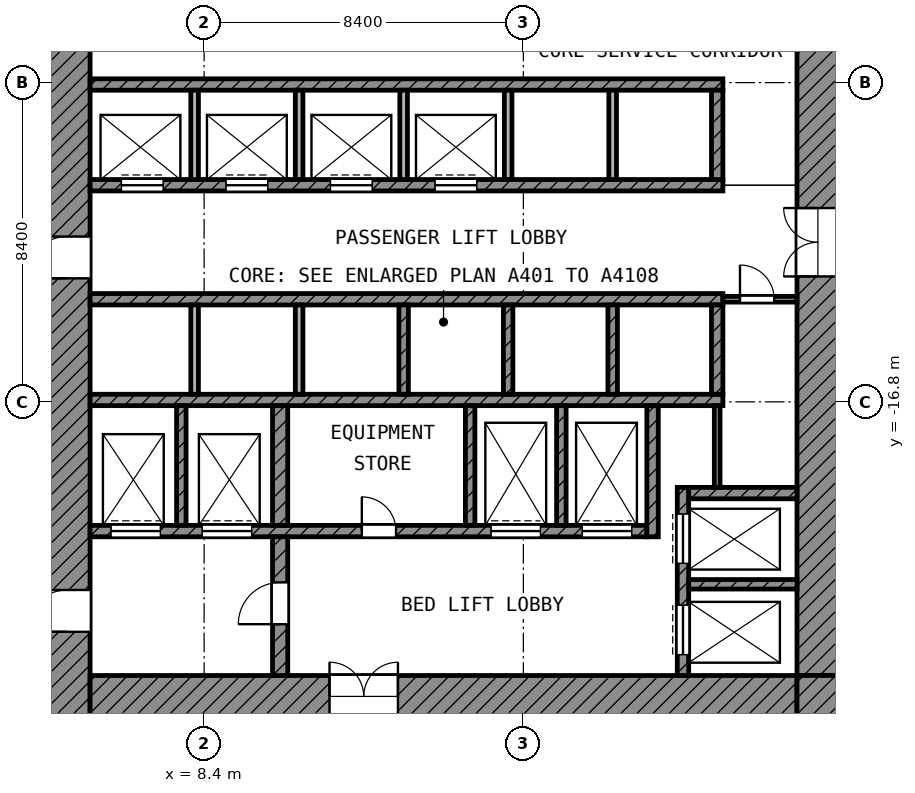
"""IFC4 building model, lengths in metres.
Left out: names, types, materials, properties, quantities, classifications, styles, units other than length and angle.
Written with IfcOpenShell. Run it as: python <this file> out.ifc"""

import sys

from ifc_helpers import new_model, si_unit, direction, frame, frame_2d, origin, place, context, subcontext, project, spatial, rectangle, extrude, element, fill, save


model = new_model("IFC4")
c1 = context("Model", 3, precision=1e-05, world=origin(), true_north=direction((0.0, 1.0)))
c2 = subcontext(c1, "Body", "Model", "MODEL_VIEW")
j1 = project(units=[si_unit("LENGTHUNIT", "METRE"), si_unit("PLANEANGLEUNIT", "RADIAN")], contexts=[c1])
p1 = place(None, origin())
s1 = spatial("IfcSite", under=j1, at=p1, CompositionType="ELEMENT")
p2 = place(p1, origin())
s2 = spatial("IfcBuilding", under=s1, at=p2, CompositionType="ELEMENT")
p3 = place(p2, frame((0.0, 0.0, 60.2)))
s3 = spatial("IfcBuildingStorey", under=s2, at=p3, CompositionType="ELEMENT", Elevation=60.2)
p4 = place(p3, frame((4.8, -25.1, 0.0), z_axis=(0.0, 0.0, 1.0), x_axis=(0.0, 1.0, 0.0)))
e1 = element("IfcWall", 1, at=p4, inside=s3, PredefinedType="SHEAR", context=c2, shape_type="SweptSolid", body=[
    extrude(rectangle(XDim=19.7, YDim=1.2, at=frame_2d((9.85, 0.0))), origin(), (0.0, 0.0, 1.0), 3.9),
])
p5 = place(p4, frame((11.55, 0.0, 0.0)))
e2 = element("IfcOpeningElement", 2, at=p5, cuts=e1, PredefinedType="OPENING", context=c2, shape_type="SweptSolid", body=[
    extrude(rectangle(XDim=1.1, YDim=2.1, at=frame_2d((0.55, 1.05))), frame((0.0, 0.61, 0.0), z_axis=(0.0, -1.0, 0.0), x_axis=(1.0, 0.0, 0.0)), (0.0, 0.0, 1.0), 1.22),
])
p6 = place(p4, frame((2.25, 0.0, 0.0)))
e3 = element("IfcOpeningElement", 3, at=p6, cuts=e1, PredefinedType="OPENING", context=c2, shape_type="SweptSolid", body=[
    extrude(rectangle(XDim=1.1, YDim=2.1, at=frame_2d((0.55, 1.05))), frame((0.0, 0.61, 0.0), z_axis=(0.0, -1.0, 0.0), x_axis=(1.0, 0.0, 0.0)), (0.0, 0.0, 1.0), 1.22),
])
p7 = place(p3, frame((24.55, -24.0, 0.0), z_axis=(0.0, 0.0, 1.0), x_axis=(0.0, 1.0, 0.0)))
e4 = element("IfcWall", 4, at=p7, inside=s3, PredefinedType="SHEAR", context=c2, shape_type="SweptSolid", body=[
    extrude(rectangle(XDim=18.6, YDim=1.1, at=frame_2d((9.3, 0.0))), origin(), (0.0, 0.0, 1.0), 3.9),
])
p8 = place(p7, frame((10.5, 0.0, 0.0)))
e5 = element("IfcOpeningElement", 5, at=p8, cuts=e4, PredefinedType="OPENING", context=c2, shape_type="SweptSolid", body=[
    extrude(rectangle(XDim=1.8, YDim=2.1, at=frame_2d((0.9, 1.05))), frame((0.0, 0.56, 0.0), z_axis=(0.0, -1.0, 0.0), x_axis=(1.0, 0.0, 0.0)), (0.0, 0.0, 1.0), 1.12),
])
p9 = place(p3, frame((5.4, -24.55, 0.0), z_axis=(0.0, 0.0, 1.0), x_axis=(1.0, 0.0, 0.0)))
e6 = element("IfcWall", 6, at=p9, inside=s3, PredefinedType="SHEAR", context=c2, shape_type="SweptSolid", body=[
    extrude(rectangle(XDim=18.6, YDim=1.1, at=frame_2d((9.3, 0.0))), origin(), (0.0, 0.0, 1.0), 3.9),
])
p10 = place(p9, frame((6.3, 0.0, 0.0)))
e7 = element("IfcOpeningElement", 7, at=p10, cuts=e6, PredefinedType="OPENING", context=c2, shape_type="SweptSolid", body=[
    extrude(rectangle(XDim=1.8, YDim=2.1, at=frame_2d((0.9, 1.05))), frame((0.0, 0.56, 0.0), z_axis=(0.0, -1.0, 0.0), x_axis=(1.0, 0.0, 0.0)), (0.0, 0.0, 1.0), 1.12),
])
p11 = place(p3, frame((24.55, -25.1, 0.0), z_axis=(0.0, 0.0, 1.0), x_axis=(0.0, 1.0, 0.0)))
e8 = element("IfcWall", 8, at=p11, inside=s3, PredefinedType="SHEAR", context=c2, shape_type="SweptSolid", body=[
    extrude(rectangle(XDim=1.1, YDim=1.1, at=frame_2d((0.55, 0.0))), origin(), (0.0, 0.0, 1.0), 3.9),
])
p12 = place(p3, frame((5.4, -8.45, 0.0), z_axis=(0.0, 0.0, 1.0), x_axis=(1.0, 0.0, 0.0)))
e9 = element("IfcWall", 9, at=p12, inside=s3, PredefinedType="SHEAR", context=c2, shape_type="SweptSolid", body=[
    extrude(rectangle(XDim=16.65, YDim=0.3, at=frame_2d((8.325, 0.0))), origin(), (0.0, 0.0, 1.0), 3.9),
])
p13 = place(p3, frame((5.4, -11.1, 0.0), z_axis=(0.0, 0.0, 1.0), x_axis=(1.0, 0.0, 0.0)))
e10 = element("IfcWall", 10, at=p13, inside=s3, PredefinedType="SHEAR", context=c2, shape_type="SweptSolid", body=[
    extrude(rectangle(XDim=16.65, YDim=0.3, at=frame_2d((8.325, 0.0))), origin(), (0.0, 0.0, 1.0), 3.9),
])
p14 = place(p13, frame((0.825, 0.0, 0.0)))
e11 = element("IfcOpeningElement", 11, at=p14, cuts=e10, PredefinedType="OPENING", context=c2, shape_type="SweptSolid", body=[
    extrude(rectangle(XDim=1.1, YDim=2.1, at=frame_2d((0.55, 1.05))), frame((0.0, 0.16, 0.0), z_axis=(0.0, -1.0, 0.0), x_axis=(1.0, 0.0, 0.0)), (0.0, 0.0, 1.0), 0.32),
])
p15 = place(p13, frame((3.575, 0.0, 0.0)))
e12 = element("IfcOpeningElement", 12, at=p15, cuts=e10, PredefinedType="OPENING", context=c2, shape_type="SweptSolid", body=[
    extrude(rectangle(XDim=1.1, YDim=2.1, at=frame_2d((0.55, 1.05))), frame((0.0, 0.16, 0.0), z_axis=(0.0, -1.0, 0.0), x_axis=(1.0, 0.0, 0.0)), (0.0, 0.0, 1.0), 0.32),
])
p16 = place(p13, frame((6.325, 0.0, 0.0)))
e13 = element("IfcOpeningElement", 13, at=p16, cuts=e10, PredefinedType="OPENING", context=c2, shape_type="SweptSolid", body=[
    extrude(rectangle(XDim=1.1, YDim=2.1, at=frame_2d((0.55, 1.05))), frame((0.0, 0.16, 0.0), z_axis=(0.0, -1.0, 0.0), x_axis=(1.0, 0.0, 0.0)), (0.0, 0.0, 1.0), 0.32),
])
p17 = place(p13, frame((9.075, 0.0, 0.0)))
e14 = element("IfcOpeningElement", 14, at=p17, cuts=e10, PredefinedType="OPENING", context=c2, shape_type="SweptSolid", body=[
    extrude(rectangle(XDim=1.1, YDim=2.1, at=frame_2d((0.55, 1.05))), frame((0.0, 0.16, 0.0), z_axis=(0.0, -1.0, 0.0), x_axis=(1.0, 0.0, 0.0)), (0.0, 0.0, 1.0), 0.32),
])
for number, where, z_axis, x_axis in (
    (15, (5.4, -14.1, 0.0), (0.0, 0.0, 1.0), (1.0, 0.0, 0.0)),
    (16, (5.4, -16.75, 0.0), (0.0, 0.0, 1.0), (1.0, 0.0, 0.0)),
):
    element("IfcWall", number, at=place(p3, frame(where, z_axis=z_axis, x_axis=x_axis)), inside=s3, PredefinedType="SHEAR", context=c2, shape_type="SweptSolid", body=[
        extrude(rectangle(XDim=16.65, YDim=0.3, at=frame_2d((8.325, 0.0))), origin(), (0.0, 0.0, 1.0), 3.9),
    ])
p18 = place(p3, frame((5.4, -20.2, 0.0), z_axis=(0.0, 0.0, 1.0), x_axis=(1.0, 0.0, 0.0)))
e17 = element("IfcWall", 17, at=p18, inside=s3, PredefinedType="SHEAR", context=c2, shape_type="SweptSolid", body=[
    extrude(rectangle(XDim=14.65, YDim=0.3, at=frame_2d((7.325, 0.0))), origin(), (0.0, 0.0, 1.0), 3.9),
])
p19 = place(p18, frame((10.55, 0.0, 0.0)))
e18 = element("IfcOpeningElement", 18, at=p19, cuts=e17, PredefinedType="OPENING", context=c2, shape_type="SweptSolid", body=[
    extrude(rectangle(XDim=1.3, YDim=2.1, at=frame_2d((0.65, 1.05))), frame((0.0, 0.16, 0.0), z_axis=(0.0, -1.0, 0.0), x_axis=(1.0, 0.0, 0.0)), (0.0, 0.0, 1.0), 0.32),
])
p20 = place(p18, frame((12.95, 0.0, 0.0)))
e19 = element("IfcOpeningElement", 19, at=p20, cuts=e17, PredefinedType="OPENING", context=c2, shape_type="SweptSolid", body=[
    extrude(rectangle(XDim=1.3, YDim=2.1, at=frame_2d((0.65, 1.05))), frame((0.0, 0.16, 0.0), z_axis=(0.0, -1.0, 0.0), x_axis=(1.0, 0.0, 0.0)), (0.0, 0.0, 1.0), 0.32),
])
p21 = place(p18, frame((0.55, 0.0, 0.0)))
e20 = element("IfcOpeningElement", 20, at=p21, cuts=e17, PredefinedType="OPENING", context=c2, shape_type="SweptSolid", body=[
    extrude(rectangle(XDim=1.3, YDim=2.1, at=frame_2d((0.65, 1.05))), frame((0.0, 0.16, 0.0), z_axis=(0.0, -1.0, 0.0), x_axis=(1.0, 0.0, 0.0)), (0.0, 0.0, 1.0), 0.32),
])
p22 = place(p18, frame((2.95, 0.0, 0.0)))
e21 = element("IfcOpeningElement", 21, at=p22, cuts=e17, PredefinedType="OPENING", context=c2, shape_type="SweptSolid", body=[
    extrude(rectangle(XDim=1.3, YDim=2.1, at=frame_2d((0.65, 1.05))), frame((0.0, 0.16, 0.0), z_axis=(0.0, -1.0, 0.0), x_axis=(1.0, 0.0, 0.0)), (0.0, 0.0, 1.0), 0.32),
])
p23 = place(p18, frame((7.15, 0.0, 0.0)))
e22 = element("IfcOpeningElement", 22, at=p23, cuts=e17, PredefinedType="OPENING", context=c2, shape_type="SweptSolid", body=[
    extrude(rectangle(XDim=0.9, YDim=2.1, at=frame_2d((0.45, 1.05))), frame((0.0, 0.16, 0.0), z_axis=(0.0, -1.0, 0.0), x_axis=(1.0, 0.0, 0.0)), (0.0, 0.0, 1.0), 0.32),
])
p24 = place(p3, frame((10.4, -24.0, 0.0), z_axis=(0.0, 0.0, 1.0), x_axis=(0.0, 1.0, 0.0)))
e23 = element("IfcWall", 23, at=p24, inside=s3, PredefinedType="SHEAR", context=c2, shape_type="SweptSolid", body=[
    extrude(rectangle(XDim=3.65, YDim=0.4, at=frame_2d((1.825, 0.0))), origin(), (0.0, 0.0, 1.0), 3.9),
])
p25 = place(p24, frame((1.35, 0.0, 0.0)))
e24 = element("IfcOpeningElement", 24, at=p25, cuts=e23, PredefinedType="OPENING", context=c2, shape_type="SweptSolid", body=[
    extrude(rectangle(XDim=1.1, YDim=2.1, at=frame_2d((0.55, 1.05))), frame((0.0, 0.21, 0.0), z_axis=(0.0, -1.0, 0.0), x_axis=(1.0, 0.0, 0.0)), (0.0, 0.0, 1.0), 0.42),
])
p26 = place(p3, frame((10.4, -20.05, 0.0), z_axis=(0.0, 0.0, 1.0), x_axis=(0.0, 1.0, 0.0)))
e25 = element("IfcWall", 25, at=p26, inside=s3, PredefinedType="SHEAR", context=c2, shape_type="SweptSolid", body=[
    extrude(rectangle(XDim=3.15, YDim=0.4, at=frame_2d((1.575, 0.0))), origin(), (0.0, 0.0, 1.0), 3.9),
])
p27 = place(p3, frame((20.2, -20.35, 0.0), z_axis=(0.0, 0.0, 1.0), x_axis=(0.0, 1.0, 0.0)))
e26 = element("IfcWall", 26, at=p27, inside=s3, PredefinedType="SHEAR", context=c2, shape_type="SweptSolid", body=[
    extrude(rectangle(XDim=3.45, YDim=0.3, at=frame_2d((1.725, 0.0))), origin(), (0.0, 0.0, 1.0), 3.9),
])
p28 = place(p3, frame((21.9, -10.95, 0.0), z_axis=(0.0, 0.0, 1.0), x_axis=(0.0, 1.0, 0.0)))
e27 = element("IfcWall", 27, at=p28, inside=s3, PredefinedType="SHEAR", context=c2, shape_type="SweptSolid", body=[
    extrude(rectangle(XDim=2.35, YDim=0.3, at=frame_2d((1.175, 0.0))), origin(), (0.0, 0.0, 1.0), 3.9),
])
p29 = place(p3, frame((21.9, -16.6, 0.0), z_axis=(0.0, 0.0, 1.0), x_axis=(0.0, 1.0, 0.0)))
e28 = element("IfcWall", 28, at=p29, inside=s3, PredefinedType="SHEAR", context=c2, shape_type="SweptSolid", body=[
    extrude(rectangle(XDim=2.35, YDim=0.3, at=frame_2d((1.175, 0.0))), origin(), (0.0, 0.0, 1.0), 3.9),
])
p30 = place(p3, frame((21.15, -19.2, 0.0), z_axis=(0.0, 0.0, 1.0), x_axis=(1.0, 0.0, 0.0)))
e29 = element("IfcWall", 29, at=p30, inside=s3, PredefinedType="SHEAR", context=c2, shape_type="SweptSolid", body=[
    extrude(rectangle(XDim=2.85, YDim=0.3, at=frame_2d((1.425, 0.0))), origin(), (0.0, 0.0, 1.0), 3.9),
])
p31 = place(p3, frame((21.0, -24.0, 0.0), z_axis=(0.0, 0.0, 1.0), x_axis=(0.0, 1.0, 0.0)))
e30 = element("IfcWall", 30, at=p31, inside=s3, PredefinedType="SHEAR", context=c2, shape_type="SweptSolid", body=[
    extrude(rectangle(XDim=4.95, YDim=0.3, at=frame_2d((2.475, 0.0))), origin(), (0.0, 0.0, 1.0), 3.9),
])
p32 = place(p31, frame((2.95, 0.0, 0.0)))
e31 = element("IfcOpeningElement", 31, at=p32, cuts=e30, PredefinedType="OPENING", context=c2, shape_type="SweptSolid", body=[
    extrude(rectangle(XDim=1.3, YDim=2.1, at=frame_2d((0.65, 1.05))), frame((0.0, 0.16, 0.0), z_axis=(0.0, -1.0, 0.0), x_axis=(1.0, 0.0, 0.0)), (0.0, 0.0, 1.0), 0.32),
])
p33 = place(p31, frame((0.55, 0.0, 0.0)))
e32 = element("IfcOpeningElement", 32, at=p33, cuts=e30, PredefinedType="OPENING", context=c2, shape_type="SweptSolid", body=[
    extrude(rectangle(XDim=1.3, YDim=2.1, at=frame_2d((0.65, 1.05))), frame((0.0, 0.16, 0.0), z_axis=(0.0, -1.0, 0.0), x_axis=(1.0, 0.0, 0.0)), (0.0, 0.0, 1.0), 0.32),
])
p34 = place(p3, frame((21.15, -21.6, 0.0), z_axis=(0.0, 0.0, 1.0), x_axis=(1.0, 0.0, 0.0)))
e33 = element("IfcWall", 33, at=p34, inside=s3, PredefinedType="SHEAR", context=c2, shape_type="SweptSolid", body=[
    extrude(rectangle(XDim=2.85, YDim=0.25, at=frame_2d((1.425, 0.0))), origin(), (0.0, 0.0, 1.0), 3.9),
])
for number, where, z_axis, x_axis in (
    (34, (7.8, -20.05, 0.0), (0.0, 0.0, 1.0), (0.0, 1.0, 0.0)),
    (35, (15.4, -20.05, 0.0), (0.0, 0.0, 1.0), (0.0, 1.0, 0.0)),
    (36, (17.8, -20.05, 0.0), (0.0, 0.0, 1.0), (0.0, 1.0, 0.0)),
):
    element("IfcWall", number, at=place(p3, frame(where, z_axis=z_axis, x_axis=x_axis)), inside=s3, PredefinedType="SHEAR", context=c2, shape_type="SweptSolid", body=[
        extrude(rectangle(XDim=3.15, YDim=0.25, at=frame_2d((1.575, 0.0))), origin(), (0.0, 0.0, 1.0), 3.9),
    ])
for number, where, z_axis, x_axis in (
    (37, (8.15, -10.95, 0.0), (0.0, 0.0, 1.0), (0.0, 1.0, 0.0)),
    (38, (10.9, -10.95, 0.0), (0.0, 0.0, 1.0), (0.0, 1.0, 0.0)),
    (39, (13.65, -10.95, 0.0), (0.0, 0.0, 1.0), (0.0, 1.0, 0.0)),
    (40, (16.4, -10.95, 0.0), (0.0, 0.0, 1.0), (0.0, 1.0, 0.0)),
    (41, (19.15, -10.95, 0.0), (0.0, 0.0, 1.0), (0.0, 1.0, 0.0)),
):
    element("IfcWall", number, at=place(p3, frame(where, z_axis=z_axis, x_axis=x_axis)), inside=s3, PredefinedType="PARTITIONING", context=c2, shape_type="SweptSolid", body=[
        extrude(rectangle(XDim=2.35, YDim=0.2, at=frame_2d((1.175, 0.0))), origin(), (0.0, 0.0, 1.0), 3.9),
    ])
for number, where, z_axis, x_axis in (
    (42, (8.15, -16.6, 0.0), (0.0, 0.0, 1.0), (0.0, 1.0, 0.0)),
    (43, (10.9, -16.6, 0.0), (0.0, 0.0, 1.0), (0.0, 1.0, 0.0)),
):
    element("IfcWall", number, at=place(p3, frame(where, z_axis=z_axis, x_axis=x_axis)), inside=s3, PredefinedType="PARTITIONING", context=c2, shape_type="SweptSolid", body=[
        extrude(rectangle(XDim=2.35, YDim=0.2, at=frame_2d((1.175, 0.0))), origin(), (0.0, 0.0, 1.0), 3.9),
    ])
for number, where, z_axis, x_axis in (
    (44, (13.65, -16.6, 0.0), (0.0, 0.0, 1.0), (0.0, 1.0, 0.0)),
    (45, (16.4, -16.6, 0.0), (0.0, 0.0, 1.0), (0.0, 1.0, 0.0)),
    (46, (19.15, -16.6, 0.0), (0.0, 0.0, 1.0), (0.0, 1.0, 0.0)),
):
    element("IfcWall", number, at=place(p3, frame(where, z_axis=z_axis, x_axis=x_axis)), inside=s3, PredefinedType="SHEAR", context=c2, shape_type="SweptSolid", body=[
        extrude(rectangle(XDim=2.35, YDim=0.25, at=frame_2d((1.175, 0.0))), origin(), (0.0, 0.0, 1.0), 3.9),
    ])
p35 = place(p3, frame((21.9, -19.05, 0.0), z_axis=(0.0, 0.0, 1.0), x_axis=(0.0, 1.0, 0.0)))
e47 = element("IfcWall", 47, at=p35, inside=s3, PredefinedType="PARTITIONING", context=c2, shape_type="SweptSolid", body=[
    extrude(rectangle(XDim=2.15, YDim=0.15, at=frame_2d((1.075, 0.0))), origin(), (0.0, 0.0, 1.0), 3.9),
])
p36 = place(p3, frame((22.05, -14.1, 0.0), z_axis=(0.0, 0.0, 1.0), x_axis=(1.0, 0.0, 0.0)))
e48 = element("IfcWall", 48, at=p36, inside=s3, PredefinedType="PARTITIONING", context=c2, shape_type="SweptSolid", body=[
    extrude(rectangle(XDim=1.95, YDim=0.15, at=frame_2d((0.975, 0.0))), origin(), (0.0, 0.0, 1.0), 3.9),
])
p37 = place(p36, frame((0.45, 0.0, 0.0)))
e49 = element("IfcOpeningElement", 49, at=p37, cuts=e48, PredefinedType="OPENING", context=c2, shape_type="SweptSolid", body=[
    extrude(rectangle(XDim=0.9, YDim=2.1, at=frame_2d((0.45, 1.05))), frame((0.0, 0.085, 0.0), z_axis=(0.0, -1.0, 0.0), x_axis=(1.0, 0.0, 0.0)), (0.0, 0.0, 1.0), 0.17),
])
p38 = place(p14, origin())
e50 = element("IfcDoor", 50, at=p38, inside=s3, OperationType="DOUBLE_DOOR_SLIDING", PredefinedType="DOOR", context=c2, shape_type="SweptSolid", body=[
    extrude(rectangle(XDim=1.1, YDim=2.1, at=frame_2d((0.55, 1.05))), frame((0.0, 0.025, 0.0), z_axis=(0.0, -1.0, 0.0), x_axis=(1.0, 0.0, 0.0)), (0.0, 0.0, 1.0), 0.05),
])
fill(e11, e50)
p39 = place(p15, origin())
e51 = element("IfcDoor", 51, at=p39, inside=s3, OperationType="DOUBLE_DOOR_SLIDING", PredefinedType="DOOR", context=c2, shape_type="SweptSolid", body=[
    extrude(rectangle(XDim=1.1, YDim=2.1, at=frame_2d((0.55, 1.05))), frame((0.0, 0.025, 0.0), z_axis=(0.0, -1.0, 0.0), x_axis=(1.0, 0.0, 0.0)), (0.0, 0.0, 1.0), 0.05),
])
fill(e12, e51)
p40 = place(p16, origin())
e52 = element("IfcDoor", 52, at=p40, inside=s3, OperationType="DOUBLE_DOOR_SLIDING", PredefinedType="DOOR", context=c2, shape_type="SweptSolid", body=[
    extrude(rectangle(XDim=1.1, YDim=2.1, at=frame_2d((0.55, 1.05))), frame((0.0, 0.025, 0.0), z_axis=(0.0, -1.0, 0.0), x_axis=(1.0, 0.0, 0.0)), (0.0, 0.0, 1.0), 0.05),
])
fill(e13, e52)
p41 = place(p17, origin())
e53 = element("IfcDoor", 53, at=p41, inside=s3, OperationType="DOUBLE_DOOR_SLIDING", PredefinedType="DOOR", context=c2, shape_type="SweptSolid", body=[
    extrude(rectangle(XDim=1.1, YDim=2.1, at=frame_2d((0.55, 1.05))), frame((0.0, 0.025, 0.0), z_axis=(0.0, -1.0, 0.0), x_axis=(1.0, 0.0, 0.0)), (0.0, 0.0, 1.0), 0.05),
])
fill(e14, e53)
p42 = place(p32, origin())
e54 = element("IfcDoor", 54, at=p42, inside=s3, OperationType="DOUBLE_DOOR_SLIDING", PredefinedType="DOOR", context=c2, shape_type="SweptSolid", body=[
    extrude(rectangle(XDim=1.3, YDim=2.1, at=frame_2d((0.65, 1.05))), frame((0.0, 0.025, 0.0), z_axis=(0.0, -1.0, 0.0), x_axis=(1.0, 0.0, 0.0)), (0.0, 0.0, 1.0), 0.05),
])
fill(e31, e54)
p43 = place(p33, origin())
e55 = element("IfcDoor", 55, at=p43, inside=s3, OperationType="DOUBLE_DOOR_SLIDING", PredefinedType="DOOR", context=c2, shape_type="SweptSolid", body=[
    extrude(rectangle(XDim=1.3, YDim=2.1, at=frame_2d((0.65, 1.05))), frame((0.0, 0.025, 0.0), z_axis=(0.0, -1.0, 0.0), x_axis=(1.0, 0.0, 0.0)), (0.0, 0.0, 1.0), 0.05),
])
fill(e32, e55)
p44 = place(p19, origin())
e56 = element("IfcDoor", 56, at=p44, inside=s3, OperationType="DOUBLE_DOOR_SLIDING", PredefinedType="DOOR", context=c2, shape_type="SweptSolid", body=[
    extrude(rectangle(XDim=1.3, YDim=2.1, at=frame_2d((0.65, 1.05))), frame((0.0, 0.025, 0.0), z_axis=(0.0, -1.0, 0.0), x_axis=(1.0, 0.0, 0.0)), (0.0, 0.0, 1.0), 0.05),
])
fill(e18, e56)
p45 = place(p20, origin())
e57 = element("IfcDoor", 57, at=p45, inside=s3, OperationType="DOUBLE_DOOR_SLIDING", PredefinedType="DOOR", context=c2, shape_type="SweptSolid", body=[
    extrude(rectangle(XDim=1.3, YDim=2.1, at=frame_2d((0.65, 1.05))), frame((0.0, 0.025, 0.0), z_axis=(0.0, -1.0, 0.0), x_axis=(1.0, 0.0, 0.0)), (0.0, 0.0, 1.0), 0.05),
])
fill(e19, e57)
p46 = place(p21, origin())
e58 = element("IfcDoor", 58, at=p46, inside=s3, OperationType="DOUBLE_DOOR_SLIDING", PredefinedType="DOOR", context=c2, shape_type="SweptSolid", body=[
    extrude(rectangle(XDim=1.3, YDim=2.1, at=frame_2d((0.65, 1.05))), frame((0.0, 0.025, 0.0), z_axis=(0.0, -1.0, 0.0), x_axis=(1.0, 0.0, 0.0)), (0.0, 0.0, 1.0), 0.05),
])
fill(e20, e58)
p47 = place(p22, origin())
e59 = element("IfcDoor", 59, at=p47, inside=s3, OperationType="DOUBLE_DOOR_SLIDING", PredefinedType="DOOR", context=c2, shape_type="SweptSolid", body=[
    extrude(rectangle(XDim=1.3, YDim=2.1, at=frame_2d((0.65, 1.05))), frame((0.0, 0.025, 0.0), z_axis=(0.0, -1.0, 0.0), x_axis=(1.0, 0.0, 0.0)), (0.0, 0.0, 1.0), 0.05),
])
fill(e21, e59)
p48 = place(p5, origin())
e60 = element("IfcDoor", 60, at=p48, inside=s3, OperationType="SINGLE_SWING_LEFT", PredefinedType="DOOR", context=c2, shape_type="SweptSolid", body=[
    extrude(rectangle(XDim=1.1, YDim=2.1, at=frame_2d((0.55, 1.05))), frame((0.0, 0.025, 0.0), z_axis=(0.0, -1.0, 0.0), x_axis=(1.0, 0.0, 0.0)), (0.0, 0.0, 1.0), 0.05),
])
fill(e2, e60)
p49 = place(p6, origin())
e61 = element("IfcDoor", 61, at=p49, inside=s3, OperationType="SINGLE_SWING_LEFT", PredefinedType="DOOR", context=c2, shape_type="SweptSolid", body=[
    extrude(rectangle(XDim=1.1, YDim=2.1, at=frame_2d((0.55, 1.05))), frame((0.0, 0.025, 0.0), z_axis=(0.0, -1.0, 0.0), x_axis=(1.0, 0.0, 0.0)), (0.0, 0.0, 1.0), 0.05),
])
fill(e3, e61)
p50 = place(p25, origin())
e62 = element("IfcDoor", 62, at=p50, inside=s3, OperationType="SINGLE_SWING_LEFT", PredefinedType="DOOR", context=c2, shape_type="SweptSolid", body=[
    extrude(rectangle(XDim=1.1, YDim=2.1, at=frame_2d((0.55, 1.05))), frame((0.0, 0.025, 0.0), z_axis=(0.0, -1.0, 0.0), x_axis=(1.0, 0.0, 0.0)), (0.0, 0.0, 1.0), 0.05),
])
fill(e24, e62)
p51 = place(p8, origin())
e63 = element("IfcDoor", 63, at=p51, inside=s3, OperationType="DOUBLE_DOOR_SINGLE_SWING", PredefinedType="DOOR", context=c2, shape_type="SweptSolid", body=[
    extrude(rectangle(XDim=1.8, YDim=2.1, at=frame_2d((0.9, 1.05))), frame((0.0, 0.025, 0.0), z_axis=(0.0, -1.0, 0.0), x_axis=(1.0, 0.0, 0.0)), (0.0, 0.0, 1.0), 0.05),
])
fill(e5, e63)
p52 = place(p10, origin())
e64 = element("IfcDoor", 64, at=p52, inside=s3, OperationType="DOUBLE_DOOR_SINGLE_SWING", PredefinedType="DOOR", context=c2, shape_type="SweptSolid", body=[
    extrude(rectangle(XDim=1.8, YDim=2.1, at=frame_2d((0.9, 1.05))), frame((0.0, 0.025, 0.0), z_axis=(0.0, -1.0, 0.0), x_axis=(1.0, 0.0, 0.0)), (0.0, 0.0, 1.0), 0.05),
])
fill(e7, e64)
p53 = place(p37, origin())
e65 = element("IfcDoor", 65, at=p53, inside=s3, OperationType="SINGLE_SWING_LEFT", PredefinedType="DOOR", context=c2, shape_type="SweptSolid", body=[
    extrude(rectangle(XDim=0.9, YDim=2.1, at=frame_2d((0.45, 1.05))), frame((0.0, 0.025, 0.0), z_axis=(0.0, -1.0, 0.0), x_axis=(1.0, 0.0, 0.0)), (0.0, 0.0, 1.0), 0.05),
])
fill(e49, e65)
p54 = place(p23, origin())
e66 = element("IfcDoor", 66, at=p54, inside=s3, OperationType="SINGLE_SWING_LEFT", PredefinedType="DOOR", context=c2, shape_type="SweptSolid", body=[
    extrude(rectangle(XDim=0.9, YDim=2.1, at=frame_2d((0.45, 1.05))), frame((0.0, 0.025, 0.0), z_axis=(0.0, -1.0, 0.0), x_axis=(1.0, 0.0, 0.0)), (0.0, 0.0, 1.0), 0.05),
])
fill(e22, e66)
save(model, sys.argv[1])
